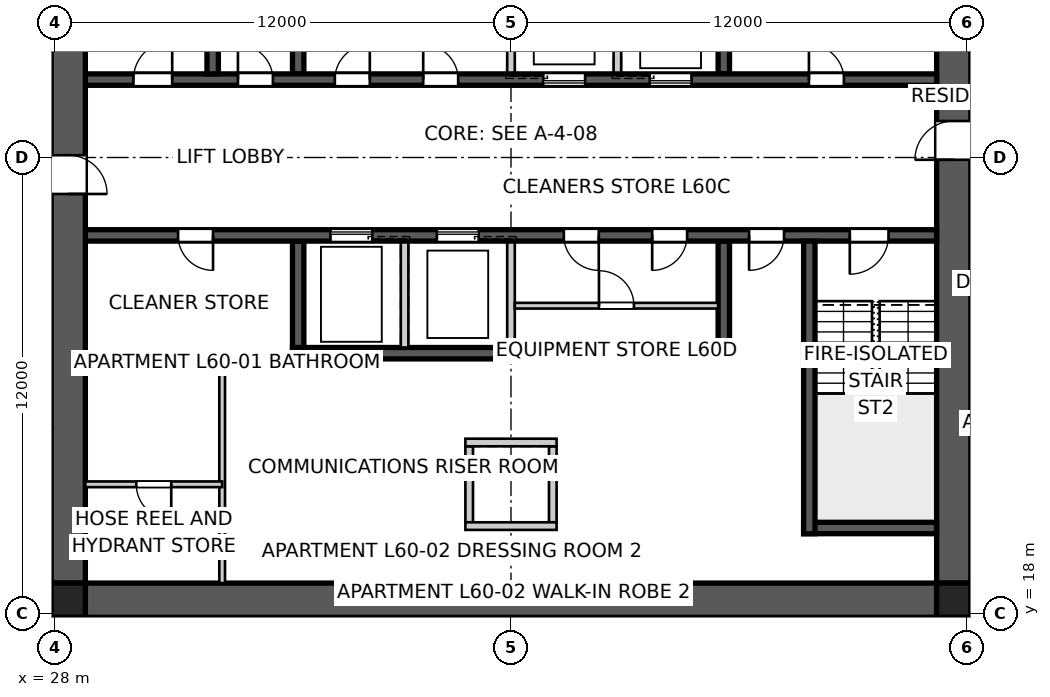
"""IFC4 building model, lengths in metres.
Left out: names, types, materials, properties, quantities, classifications, styles, units other than length and angle.
Written with IfcOpenShell. Run it as: python <this file> out.ifc"""

import sys

from ifc_helpers import new_model, si_unit, direction, frame, frame_2d, origin, origin_2d, place, context, subcontext, project, spatial, polyline, rectangle, outline, extrude, element, fill, save


model = new_model("IFC4")
c1 = context("Model", 3, precision=1e-05, world=origin(), true_north=direction((0.0, 1.0)))
c2 = subcontext(c1, "Body", "Model", "MODEL_VIEW")
j1 = project(units=[si_unit("LENGTHUNIT", "METRE"), si_unit("PLANEANGLEUNIT", "RADIAN")], contexts=[c1])
p1 = place(None, origin())
s1 = spatial("IfcSite", under=j1, at=p1, CompositionType="ELEMENT")
p2 = place(p1, origin())
s2 = spatial("IfcBuilding", under=s1, at=p2, CompositionType="ELEMENT")
p3 = place(p2, frame((0.0, 0.0, 218.4)))
s3 = spatial("IfcBuildingStorey", under=s2, at=p3, CompositionType="ELEMENT", Elevation=218.4)
p4 = place(p3, frame((51.2, 18.35, 0.0), z_axis=(0.0, 0.0, 1.0), x_axis=(-1.0, 0.0, 0.0)))
e1 = element("IfcWall", 1, at=p4, inside=s3, PredefinedType="SHEAR", context=c2, shape_type="SweptSolid", body=[
    extrude(outline(polyline([(0.0, -0.45), (22.4, -0.45), (22.4, -0.025), (22.85, -0.025), (22.85, 0.025), (22.4, 0.025), (22.4, 0.45), (0.0, 0.45), (0.0, 0.025), (-0.45, 0.025), (-0.45, -0.025), (0.0, -0.025), (0.0, -0.45)])), origin(), (0.0, 0.0, 1.0), 3.4),
])
p5 = place(p3, frame((51.65, 18.8, 0.0), z_axis=(0.0, 0.0, 1.0), x_axis=(0.0, 1.0, 0.0)))
e2 = element("IfcWall", 2, at=p5, inside=s3, PredefinedType="SHEAR", context=c2, shape_type="SweptSolid", body=[
    extrude(outline(polyline([(0.0, -0.45), (22.4, -0.45), (22.4, -0.025), (22.85, -0.025), (22.85, 0.025), (22.4, 0.025), (22.4, 0.45), (0.0, 0.45), (0.0, 0.025), (-0.45, 0.025), (-0.45, -0.025), (0.0, -0.025), (0.0, -0.45)])), origin(), (0.0, 0.0, 1.0), 3.4),
])
p6 = place(p5, frame((11.14, 0.0, 0.0)))
e3 = element("IfcOpeningElement", 3, at=p6, cuts=e2, PredefinedType="OPENING", context=c2, shape_type="SweptSolid", body=[
    extrude(rectangle(XDim=1.02, YDim=2.4, at=frame_2d((0.51, 1.2))), frame((0.0, 0.46, 0.0), z_axis=(0.0, -1.0, 0.0), x_axis=(1.0, 0.0, 0.0)), (0.0, 0.0, 1.0), 0.92),
])
p7 = place(p3, frame((28.35, 41.2, 0.0), z_axis=(0.0, 0.0, 1.0), x_axis=(0.0, -1.0, 0.0)))
e4 = element("IfcWall", 4, at=p7, inside=s3, PredefinedType="SHEAR", context=c2, shape_type="SweptSolid", body=[
    extrude(outline(polyline([(0.0, -0.45), (22.4, -0.45), (22.4, -0.025), (22.85, -0.025), (22.85, 0.025), (22.4, 0.025), (22.4, 0.45), (0.0, 0.45), (0.0, 0.025), (-0.45, 0.025), (-0.45, -0.025), (0.0, -0.025), (0.0, -0.45)])), origin(), (0.0, 0.0, 1.0), 3.4),
])
p8 = place(p7, frame((11.14, 0.0, 0.0)))
e5 = element("IfcOpeningElement", 5, at=p8, cuts=e4, PredefinedType="OPENING", context=c2, shape_type="SweptSolid", body=[
    extrude(rectangle(XDim=1.02, YDim=2.4, at=frame_2d((0.51, 1.2))), frame((0.0, 0.46, 0.0), z_axis=(0.0, -1.0, 0.0), x_axis=(1.0, 0.0, 0.0)), (0.0, 0.0, 1.0), 0.92),
])
p9 = place(p3, frame((28.8, 32.05, 0.0), z_axis=(0.0, 0.0, 1.0), x_axis=(1.0, 0.0, 0.0)))
e6 = element("IfcWall", 6, at=p9, inside=s3, PredefinedType="SHEAR", context=c2, shape_type="SweptSolid", body=[
    extrude(rectangle(XDim=22.4, YDim=0.3, at=frame_2d((11.2, 0.0))), origin(), (0.0, 0.0, 1.0), 3.4),
])
p10 = place(p9, frame((19.04, 0.0, 0.0)))
e7 = element("IfcOpeningElement", 7, at=p10, cuts=e6, PredefinedType="OPENING", context=c2, shape_type="SweptSolid", body=[
    extrude(rectangle(XDim=0.92, YDim=2.1, at=frame_2d((0.46, 1.05))), frame((0.0, 0.16, 0.0), z_axis=(0.0, -1.0, 0.0), x_axis=(1.0, 0.0, 0.0)), (0.0, 0.0, 1.0), 0.32),
])
p11 = place(p9, frame((1.265, 0.0, 0.0)))
e8 = element("IfcOpeningElement", 8, at=p11, cuts=e6, PredefinedType="OPENING", context=c2, shape_type="SweptSolid", body=[
    extrude(rectangle(XDim=1.02, YDim=2.1, at=frame_2d((0.51, 1.05))), frame((0.0, 0.16, 0.0), z_axis=(0.0, -1.0, 0.0), x_axis=(1.0, 0.0, 0.0)), (0.0, 0.0, 1.0), 0.32),
])
p12 = place(p9, frame((4.015, 0.0, 0.0)))
e9 = element("IfcOpeningElement", 9, at=p12, cuts=e6, PredefinedType="OPENING", context=c2, shape_type="SweptSolid", body=[
    extrude(rectangle(XDim=0.92, YDim=2.1, at=frame_2d((0.46, 1.05))), frame((0.0, 0.16, 0.0), z_axis=(0.0, -1.0, 0.0), x_axis=(1.0, 0.0, 0.0)), (0.0, 0.0, 1.0), 0.32),
])
p13 = place(p9, frame((6.565, 0.0, 0.0)))
e10 = element("IfcOpeningElement", 10, at=p13, cuts=e6, PredefinedType="OPENING", context=c2, shape_type="SweptSolid", body=[
    extrude(rectangle(XDim=0.92, YDim=2.1, at=frame_2d((0.46, 1.05))), frame((0.0, 0.16, 0.0), z_axis=(0.0, -1.0, 0.0), x_axis=(1.0, 0.0, 0.0)), (0.0, 0.0, 1.0), 0.32),
])
p14 = place(p9, frame((8.89, 0.0, 0.0)))
e11 = element("IfcOpeningElement", 11, at=p14, cuts=e6, PredefinedType="OPENING", context=c2, shape_type="SweptSolid", body=[
    extrude(rectangle(XDim=0.92, YDim=2.1, at=frame_2d((0.46, 1.05))), frame((0.0, 0.16, 0.0), z_axis=(0.0, -1.0, 0.0), x_axis=(1.0, 0.0, 0.0)), (0.0, 0.0, 1.0), 0.32),
])
p15 = place(p9, frame((12.05, 0.0, 0.0)))
e12 = element("IfcOpeningElement", 12, at=p15, cuts=e6, PredefinedType="OPENING", context=c2, shape_type="SweptSolid", body=[
    extrude(rectangle(XDim=1.1, YDim=2.1, at=frame_2d((0.55, 1.05))), frame((0.0, 0.16, 0.0), z_axis=(0.0, -1.0, 0.0), x_axis=(1.0, 0.0, 0.0)), (0.0, 0.0, 1.0), 0.32),
])
p16 = place(p9, frame((14.85, 0.0, 0.0)))
e13 = element("IfcOpeningElement", 13, at=p16, cuts=e6, PredefinedType="OPENING", context=c2, shape_type="SweptSolid", body=[
    extrude(rectangle(XDim=1.1, YDim=2.1, at=frame_2d((0.55, 1.05))), frame((0.0, 0.16, 0.0), z_axis=(0.0, -1.0, 0.0), x_axis=(1.0, 0.0, 0.0)), (0.0, 0.0, 1.0), 0.32),
])
p17 = place(p3, frame((51.2, 27.95, 0.0), z_axis=(0.0, 0.0, 1.0), x_axis=(-1.0, 0.0, 0.0)))
e14 = element("IfcWall", 14, at=p17, inside=s3, PredefinedType="SHEAR", context=c2, shape_type="SweptSolid", body=[
    extrude(rectangle(XDim=22.4, YDim=0.3, at=frame_2d((11.2, 0.0))), origin(), (0.0, 0.0, 1.0), 3.4),
])
p18 = place(p17, frame((19.04, 0.0, 0.0)))
e15 = element("IfcOpeningElement", 15, at=p18, cuts=e14, PredefinedType="OPENING", context=c2, shape_type="SweptSolid", body=[
    extrude(rectangle(XDim=0.92, YDim=2.1, at=frame_2d((0.46, 1.05))), frame((0.0, 0.16, 0.0), z_axis=(0.0, -1.0, 0.0), x_axis=(1.0, 0.0, 0.0)), (0.0, 0.0, 1.0), 0.32),
])
p19 = place(p17, frame((1.265, 0.0, 0.0)))
e16 = element("IfcOpeningElement", 16, at=p19, cuts=e14, PredefinedType="OPENING", context=c2, shape_type="SweptSolid", body=[
    extrude(rectangle(XDim=1.02, YDim=2.1, at=frame_2d((0.51, 1.05))), frame((0.0, 0.16, 0.0), z_axis=(0.0, -1.0, 0.0), x_axis=(1.0, 0.0, 0.0)), (0.0, 0.0, 1.0), 0.32),
])
p20 = place(p17, frame((4.015, 0.0, 0.0)))
e17 = element("IfcOpeningElement", 17, at=p20, cuts=e14, PredefinedType="OPENING", context=c2, shape_type="SweptSolid", body=[
    extrude(rectangle(XDim=0.92, YDim=2.1, at=frame_2d((0.46, 1.05))), frame((0.0, 0.16, 0.0), z_axis=(0.0, -1.0, 0.0), x_axis=(1.0, 0.0, 0.0)), (0.0, 0.0, 1.0), 0.32),
])
p21 = place(p17, frame((8.89, 0.0, 0.0)))
e18 = element("IfcOpeningElement", 18, at=p21, cuts=e14, PredefinedType="OPENING", context=c2, shape_type="SweptSolid", body=[
    extrude(rectangle(XDim=0.92, YDim=2.1, at=frame_2d((0.46, 1.05))), frame((0.0, 0.16, 0.0), z_axis=(0.0, -1.0, 0.0), x_axis=(1.0, 0.0, 0.0)), (0.0, 0.0, 1.0), 0.32),
])
p22 = place(p17, frame((6.565, 0.0, 0.0)))
e19 = element("IfcOpeningElement", 19, at=p22, cuts=e14, PredefinedType="OPENING", context=c2, shape_type="SweptSolid", body=[
    extrude(rectangle(XDim=0.92, YDim=2.1, at=frame_2d((0.46, 1.05))), frame((0.0, 0.16, 0.0), z_axis=(0.0, -1.0, 0.0), x_axis=(1.0, 0.0, 0.0)), (0.0, 0.0, 1.0), 0.32),
])
p23 = place(p17, frame((12.05, 0.0, 0.0)))
e20 = element("IfcOpeningElement", 20, at=p23, cuts=e14, PredefinedType="OPENING", context=c2, shape_type="SweptSolid", body=[
    extrude(rectangle(XDim=1.1, YDim=2.1, at=frame_2d((0.55, 1.05))), frame((0.0, 0.16, 0.0), z_axis=(0.0, -1.0, 0.0), x_axis=(1.0, 0.0, 0.0)), (0.0, 0.0, 1.0), 0.32),
])
p24 = place(p17, frame((14.85, 0.0, 0.0)))
e21 = element("IfcOpeningElement", 21, at=p24, cuts=e14, PredefinedType="OPENING", context=c2, shape_type="SweptSolid", body=[
    extrude(rectangle(XDim=1.1, YDim=2.1, at=frame_2d((0.55, 1.05))), frame((0.0, 0.16, 0.0), z_axis=(0.0, -1.0, 0.0), x_axis=(1.0, 0.0, 0.0)), (0.0, 0.0, 1.0), 0.32),
])
p25 = place(p3, frame((45.75, 24.85, 0.0), z_axis=(0.0, 0.0, 1.0), x_axis=(-1.0, 0.0, 0.0)))
e22 = element("IfcWall", 22, at=p25, inside=s3, PredefinedType="SHEAR", context=c2, shape_type="SweptSolid", body=[
    extrude(rectangle(XDim=11.5, YDim=0.3, at=frame_2d((5.75, 0.0))), origin(), (0.0, 0.0, 1.0), 3.4),
])
for number, where, z_axis, x_axis in (
    (23, (34.4, 32.2, 0.0), (0.0, 0.0, 1.0), (0.0, 1.0, 0.0)),
    (24, (45.6, 27.8, 0.0), (0.0, 0.0, 1.0), (0.0, -1.0, 0.0)),
):
    element("IfcWall", number, at=place(p3, frame(where, z_axis=z_axis, x_axis=x_axis)), inside=s3, PredefinedType="SHEAR", context=c2, shape_type="SweptSolid", body=[
        extrude(rectangle(XDim=2.8, YDim=0.3, at=frame_2d((1.4, 0.0))), origin(), (0.0, 0.0, 1.0), 3.4),
    ])
for number, where, z_axis, x_axis in (
    (25, (40.0, 32.2, 0.0), (0.0, 0.0, 1.0), (0.0, 1.0, 0.0)),
    (26, (40.0, 27.8, 0.0), (0.0, 0.0, 1.0), (0.0, -1.0, 0.0)),
    (27, (42.8, 32.2, 0.0), (0.0, 0.0, 1.0), (0.0, 1.0, 0.0)),
    (28, (37.2, 27.8, 0.0), (0.0, 0.0, 1.0), (0.0, -1.0, 0.0)),
):
    element("IfcWall", number, at=place(p3, frame(where, z_axis=z_axis, x_axis=x_axis)), inside=s3, PredefinedType="SOLIDWALL", context=c2, shape_type="SweptSolid", body=[
        extrude(rectangle(XDim=2.8, YDim=0.2, at=frame_2d((1.4, 0.0))), origin(), (0.0, 0.0, 1.0), 3.4),
    ])
for number, where, z_axis, x_axis in (
    (29, (45.6, 32.2, 0.0), (0.0, 0.0, 1.0), (0.0, 1.0, 0.0)),
    (30, (34.4, 27.8, 0.0), (0.0, 0.0, 1.0), (0.0, -1.0, 0.0)),
):
    element("IfcWall", number, at=place(p3, frame(where, z_axis=z_axis, x_axis=x_axis)), inside=s3, PredefinedType="SHEAR", context=c2, shape_type="SweptSolid", body=[
        extrude(rectangle(XDim=2.8, YDim=0.3, at=frame_2d((1.4, 0.0))), origin(), (0.0, 0.0, 1.0), 3.4),
    ])
for number, where, z_axis, x_axis in (
    (31, (32.15, 32.2, 0.0), (0.0, 0.0, 1.0), (0.0, 1.0, 0.0)),
    (32, (47.85, 27.8, 0.0), (0.0, 0.0, 1.0), (0.0, -1.0, 0.0)),
):
    element("IfcWall", number, at=place(p3, frame(where, z_axis=z_axis, x_axis=x_axis)), inside=s3, PredefinedType="SHEAR", context=c2, shape_type="SweptSolid", body=[
        extrude(rectangle(XDim=7.7, YDim=0.3, at=frame_2d((3.85, 0.0))), origin(), (0.0, 0.0, 1.0), 3.4),
    ])
p26 = place(p3, frame((51.2, 20.25, 0.0), z_axis=(0.0, 0.0, 1.0), x_axis=(-1.0, 0.0, 0.0)))
e33 = element("IfcWall", 33, at=p26, inside=s3, PredefinedType="SHEAR", context=c2, shape_type="SweptSolid", body=[
    extrude(rectangle(XDim=3.5, YDim=0.3, at=frame_2d((1.75, 0.0))), origin(), (0.0, 0.0, 1.0), 3.4),
])
for number, where, z_axis, x_axis in (
    (34, (38.9, 22.4, 0.0), (0.0, 0.0, 1.0), (0.0, -1.0, 0.0)),
    (35, (41.1, 22.4, 0.0), (0.0, 0.0, 1.0), (0.0, -1.0, 0.0)),
):
    element("IfcWall", number, at=place(p3, frame(where, z_axis=z_axis, x_axis=x_axis)), inside=s3, PredefinedType="SOLIDWALL", context=c2, shape_type="SweptSolid", body=[
        extrude(rectangle(XDim=2.0, YDim=0.2, at=frame_2d((1.0, 0.0))), origin(), (0.0, 0.0, 1.0), 3.4),
    ])
for number, where, z_axis, x_axis in (
    (36, (38.8, 22.5, 0.0), (0.0, 0.0, 1.0), (1.0, 0.0, 0.0)),
    (37, (38.8, 20.3, 0.0), (0.0, 0.0, 1.0), (1.0, 0.0, 0.0)),
):
    element("IfcWall", number, at=place(p3, frame(where, z_axis=z_axis, x_axis=x_axis)), inside=s3, PredefinedType="SOLIDWALL", context=c2, shape_type="SweptSolid", body=[
        extrude(rectangle(XDim=2.4, YDim=0.2, at=frame_2d((1.2, 0.0))), origin(), (0.0, 0.0, 1.0), 3.4),
    ])
for number, where, z_axis, x_axis in (
    (38, (28.35, 18.35, 0.0), (0.0, 0.0, 1.0), (1.0, 0.0, 0.0)),
    (39, (51.65, 18.35, 0.0), (0.0, 0.0, 1.0), (1.0, 0.0, 0.0)),
):
    element("IfcColumn", number, at=place(p3, frame(where, z_axis=z_axis, x_axis=x_axis)), inside=s3, PredefinedType="COLUMN", context=c2, shape_type="SweptSolid", body=[
        extrude(rectangle(XDim=0.9, YDim=0.9, at=origin_2d()), origin(), (0.0, 0.0, 1.0), 3.4),
    ])
p27 = place(p3, frame((20.514, 18.75, 0.0), z_axis=(0.0, 0.0, 1.0), x_axis=(0.866020489494, 0.500008511703, 0.0)))
e40 = element("IfcWall", 40, at=p27, inside=s3, PredefinedType="PARTITIONING", context=c2, shape_type="SweptSolid", body=[
    extrude(rectangle(XDim=8.496, YDim=0.25, at=frame_2d((4.248, 0.0))), origin(), (0.0, 0.0, 1.0), 3.25),
])
p28 = place(p3, frame((32.4, 18.8, 0.0), z_axis=(0.0, 0.0, 1.0), x_axis=(0.0, 1.0, 0.0)))
e41 = element("IfcWall", 41, at=p28, inside=s3, PredefinedType="SOLIDWALL", context=c2, shape_type="SweptSolid", body=[
    extrude(rectangle(XDim=5.9, YDim=0.15, at=frame_2d((2.95, 0.0))), origin(), (0.0, 0.0, 1.0), 3.25),
])
p29 = place(p3, frame((32.4, 24.7, 0.0), z_axis=(0.0, 0.0, 1.0), x_axis=(1.0, 0.0, 0.0)))
e42 = element("IfcWall", 42, at=p29, inside=s3, PredefinedType="SOLIDWALL", context=c2, shape_type="SweptSolid", body=[
    extrude(rectangle(XDim=1.85, YDim=0.15, at=frame_2d((0.925, 0.0))), origin(), (0.0, 0.0, 1.0), 3.25),
])
p30 = place(p3, frame((32.4, 21.4, 0.0), z_axis=(0.0, 0.0, 1.0), x_axis=(-1.0, 0.0, 0.0)))
e43 = element("IfcWall", 43, at=p30, inside=s3, PredefinedType="SOLIDWALL", context=c2, shape_type="SweptSolid", body=[
    extrude(rectangle(XDim=3.6, YDim=0.15, at=frame_2d((1.8, 0.0))), origin(), (0.0, 0.0, 1.0), 3.25),
])
p31 = place(p30, frame((1.34, 0.0, 0.0)))
e44 = element("IfcOpeningElement", 44, at=p31, cuts=e43, PredefinedType="OPENING", context=c2, shape_type="SweptSolid", body=[
    extrude(rectangle(XDim=0.92, YDim=2.1, at=frame_2d((0.46, 1.05))), frame((0.0, 0.085, 0.0), z_axis=(0.0, -1.0, 0.0), x_axis=(1.0, 0.0, 0.0)), (0.0, 0.0, 1.0), 0.17),
])
p32 = place(p3, frame((52.1, 17.956, 0.0), z_axis=(0.0, 0.0, 1.0), x_axis=(0.0, 1.0, 0.0)))
e45 = element("IfcWall", 45, at=p32, inside=s3, PredefinedType="PARTITIONING", context=c2, shape_type="SweptSolid", body=[
    extrude(rectangle(XDim=0.864, YDim=0.12, at=frame_2d((0.432, 0.0))), origin(), (0.0, 0.0, 1.0), 3.25),
])
p33 = place(p3, frame((51.757, 17.9, 0.0), z_axis=(0.0, 0.0, 1.0), x_axis=(0.986864404584, 0.161550756622, 0.0)))
e46 = element("IfcWall", 46, at=p33, inside=s3, PredefinedType="SOLIDWALL", context=c2, shape_type="SweptSolid", body=[
    extrude(rectangle(XDim=0.348, YDim=0.15, at=frame_2d((0.174, 0.0))), origin(), (0.0, 0.0, 1.0), 3.25),
])
p34 = place(p3, frame((40.1, 26.1, 0.0), z_axis=(0.0, 0.0, 1.0), x_axis=(1.0, 0.0, 0.0)))
e47 = element("IfcWall", 47, at=p34, inside=s3, PredefinedType="SOLIDWALL", context=c2, shape_type="SweptSolid", body=[
    extrude(rectangle(XDim=5.35, YDim=0.15, at=frame_2d((2.675, 0.0))), origin(), (0.0, 0.0, 1.0), 3.25),
])
p35 = place(p34, frame((2.215, 0.0, 0.0)))
e48 = element("IfcOpeningElement", 48, at=p35, cuts=e47, PredefinedType="OPENING", context=c2, shape_type="SweptSolid", body=[
    extrude(rectangle(XDim=0.92, YDim=2.1, at=frame_2d((0.46, 1.05))), frame((0.0, 0.085, 0.0), z_axis=(0.0, -1.0, 0.0), x_axis=(1.0, 0.0, 0.0)), (0.0, 0.0, 1.0), 0.17),
])
p36 = place(p10, origin())
e49 = element("IfcDoor", 49, at=p36, inside=s3, OperationType="SINGLE_SWING_LEFT", PredefinedType="DOOR", context=c2, shape_type="SweptSolid", body=[
    extrude(rectangle(XDim=0.92, YDim=2.1, at=frame_2d((0.46, 1.05))), frame((0.0, 0.025, 0.0), z_axis=(0.0, -1.0, 0.0), x_axis=(1.0, 0.0, 0.0)), (0.0, 0.0, 1.0), 0.05),
])
fill(e7, e49)
p37 = place(p18, origin())
e50 = element("IfcDoor", 50, at=p37, inside=s3, OperationType="SINGLE_SWING_LEFT", PredefinedType="DOOR", context=c2, shape_type="SweptSolid", body=[
    extrude(rectangle(XDim=0.92, YDim=2.1, at=frame_2d((0.46, 1.05))), frame((0.0, 0.025, 0.0), z_axis=(0.0, -1.0, 0.0), x_axis=(1.0, 0.0, 0.0)), (0.0, 0.0, 1.0), 0.05),
])
fill(e15, e50)
p38 = place(p19, origin())
e51 = element("IfcDoor", 51, at=p38, inside=s3, OperationType="SINGLE_SWING_RIGHT", PredefinedType="DOOR", context=c2, shape_type="SweptSolid", body=[
    extrude(rectangle(XDim=1.02, YDim=2.1, at=frame_2d((0.51, 1.05))), frame((0.0, 0.025, 0.0), z_axis=(0.0, -1.0, 0.0), x_axis=(1.0, 0.0, 0.0)), (0.0, 0.0, 1.0), 0.05),
])
fill(e16, e51)
p39 = place(p11, origin())
e52 = element("IfcDoor", 52, at=p39, inside=s3, OperationType="SINGLE_SWING_RIGHT", PredefinedType="DOOR", context=c2, shape_type="SweptSolid", body=[
    extrude(rectangle(XDim=1.02, YDim=2.1, at=frame_2d((0.51, 1.05))), frame((0.0, 0.025, 0.0), z_axis=(0.0, -1.0, 0.0), x_axis=(1.0, 0.0, 0.0)), (0.0, 0.0, 1.0), 0.05),
])
fill(e8, e52)
p40 = place(p12, origin())
e53 = element("IfcDoor", 53, at=p40, inside=s3, OperationType="SINGLE_SWING_LEFT", PredefinedType="DOOR", context=c2, shape_type="SweptSolid", body=[
    extrude(rectangle(XDim=0.92, YDim=2.1, at=frame_2d((0.46, 1.05))), frame((0.0, 0.025, 0.0), z_axis=(0.0, -1.0, 0.0), x_axis=(1.0, 0.0, 0.0)), (0.0, 0.0, 1.0), 0.05),
])
fill(e9, e53)
p41 = place(p20, origin())
e54 = element("IfcDoor", 54, at=p41, inside=s3, OperationType="SINGLE_SWING_RIGHT", PredefinedType="DOOR", context=c2, shape_type="SweptSolid", body=[
    extrude(rectangle(XDim=0.92, YDim=2.1, at=frame_2d((0.46, 1.05))), frame((0.0, 0.025, 0.0), z_axis=(0.0, -1.0, 0.0), x_axis=(1.0, 0.0, 0.0)), (0.0, 0.0, 1.0), 0.05),
])
fill(e17, e54)
p42 = place(p31, origin())
e55 = element("IfcDoor", 55, at=p42, inside=s3, OperationType="SINGLE_SWING_LEFT", PredefinedType="DOOR", context=c2, shape_type="SweptSolid", body=[
    extrude(rectangle(XDim=0.92, YDim=2.1, at=frame_2d((0.46, 1.05))), frame((0.0, 0.025, 0.0), z_axis=(0.0, -1.0, 0.0), x_axis=(1.0, 0.0, 0.0)), (0.0, 0.0, 1.0), 0.05),
])
fill(e44, e55)
p43 = place(p13, origin())
e56 = element("IfcDoor", 56, at=p43, inside=s3, OperationType="SINGLE_SWING_RIGHT", PredefinedType="DOOR", context=c2, shape_type="SweptSolid", body=[
    extrude(rectangle(XDim=0.92, YDim=2.1, at=frame_2d((0.46, 1.05))), frame((0.0, 0.025, 0.0), z_axis=(0.0, -1.0, 0.0), x_axis=(1.0, 0.0, 0.0)), (0.0, 0.0, 1.0), 0.05),
])
fill(e10, e56)
p44 = place(p14, origin())
e57 = element("IfcDoor", 57, at=p44, inside=s3, OperationType="SINGLE_SWING_LEFT", PredefinedType="DOOR", context=c2, shape_type="SweptSolid", body=[
    extrude(rectangle(XDim=0.92, YDim=2.1, at=frame_2d((0.46, 1.05))), frame((0.0, 0.025, 0.0), z_axis=(0.0, -1.0, 0.0), x_axis=(1.0, 0.0, 0.0)), (0.0, 0.0, 1.0), 0.05),
])
fill(e11, e57)
p45 = place(p21, origin())
e58 = element("IfcDoor", 58, at=p45, inside=s3, OperationType="SINGLE_SWING_LEFT", PredefinedType="DOOR", context=c2, shape_type="SweptSolid", body=[
    extrude(rectangle(XDim=0.92, YDim=2.1, at=frame_2d((0.46, 1.05))), frame((0.0, 0.025, 0.0), z_axis=(0.0, -1.0, 0.0), x_axis=(1.0, 0.0, 0.0)), (0.0, 0.0, 1.0), 0.05),
])
fill(e18, e58)
p46 = place(p22, origin())
e59 = element("IfcDoor", 59, at=p46, inside=s3, OperationType="SINGLE_SWING_RIGHT", PredefinedType="DOOR", context=c2, shape_type="SweptSolid", body=[
    extrude(rectangle(XDim=0.92, YDim=2.1, at=frame_2d((0.46, 1.05))), frame((0.0, 0.025, 0.0), z_axis=(0.0, -1.0, 0.0), x_axis=(1.0, 0.0, 0.0)), (0.0, 0.0, 1.0), 0.05),
])
fill(e19, e59)
p47 = place(p35, origin())
e60 = element("IfcDoor", 60, at=p47, inside=s3, OperationType="SINGLE_SWING_LEFT", PredefinedType="DOOR", context=c2, shape_type="SweptSolid", body=[
    extrude(rectangle(XDim=0.92, YDim=2.1, at=frame_2d((0.46, 1.05))), frame((0.0, 0.025, 0.0), z_axis=(0.0, -1.0, 0.0), x_axis=(1.0, 0.0, 0.0)), (0.0, 0.0, 1.0), 0.05),
])
fill(e48, e60)
p48 = place(p6, origin())
e61 = element("IfcDoor", 61, at=p48, inside=s3, OperationType="SINGLE_SWING_LEFT", PredefinedType="DOOR", context=c2, shape_type="SweptSolid", body=[
    extrude(rectangle(XDim=1.02, YDim=2.4, at=frame_2d((0.51, 1.2))), frame((0.0, 0.025, 0.0), z_axis=(0.0, -1.0, 0.0), x_axis=(1.0, 0.0, 0.0)), (0.0, 0.0, 1.0), 0.05),
])
fill(e3, e61)
p49 = place(p8, origin())
e62 = element("IfcDoor", 62, at=p49, inside=s3, OperationType="SINGLE_SWING_RIGHT", PredefinedType="DOOR", context=c2, shape_type="SweptSolid", body=[
    extrude(rectangle(XDim=1.02, YDim=2.4, at=frame_2d((0.51, 1.2))), frame((0.0, 0.025, 0.0), z_axis=(0.0, -1.0, 0.0), x_axis=(1.0, 0.0, 0.0)), (0.0, 0.0, 1.0), 0.05),
])
fill(e5, e62)
p50 = place(p15, origin())
e63 = element("IfcDoor", 63, at=p50, inside=s3, OperationType="SLIDING_TO_LEFT", PredefinedType="DOOR", context=c2, shape_type="SweptSolid", body=[
    extrude(rectangle(XDim=1.1, YDim=2.1, at=frame_2d((0.55, 1.05))), frame((0.0, 0.025, 0.0), z_axis=(0.0, -1.0, 0.0), x_axis=(1.0, 0.0, 0.0)), (0.0, 0.0, 1.0), 0.05),
])
fill(e12, e63)
p51 = place(p23, origin())
e64 = element("IfcDoor", 64, at=p51, inside=s3, OperationType="SLIDING_TO_LEFT", PredefinedType="DOOR", context=c2, shape_type="SweptSolid", body=[
    extrude(rectangle(XDim=1.1, YDim=2.1, at=frame_2d((0.55, 1.05))), frame((0.0, 0.025, 0.0), z_axis=(0.0, -1.0, 0.0), x_axis=(1.0, 0.0, 0.0)), (0.0, 0.0, 1.0), 0.05),
])
fill(e20, e64)
p52 = place(p16, origin())
e65 = element("IfcDoor", 65, at=p52, inside=s3, OperationType="SLIDING_TO_LEFT", PredefinedType="DOOR", context=c2, shape_type="SweptSolid", body=[
    extrude(rectangle(XDim=1.1, YDim=2.1, at=frame_2d((0.55, 1.05))), frame((0.0, 0.025, 0.0), z_axis=(0.0, -1.0, 0.0), x_axis=(1.0, 0.0, 0.0)), (0.0, 0.0, 1.0), 0.05),
])
fill(e13, e65)
p53 = place(p24, origin())
e66 = element("IfcDoor", 66, at=p53, inside=s3, OperationType="SLIDING_TO_LEFT", PredefinedType="DOOR", context=c2, shape_type="SweptSolid", body=[
    extrude(rectangle(XDim=1.1, YDim=2.1, at=frame_2d((0.55, 1.05))), frame((0.0, 0.025, 0.0), z_axis=(0.0, -1.0, 0.0), x_axis=(1.0, 0.0, 0.0)), (0.0, 0.0, 1.0), 0.05),
])
fill(e21, e66)
save(model, sys.argv[1])
